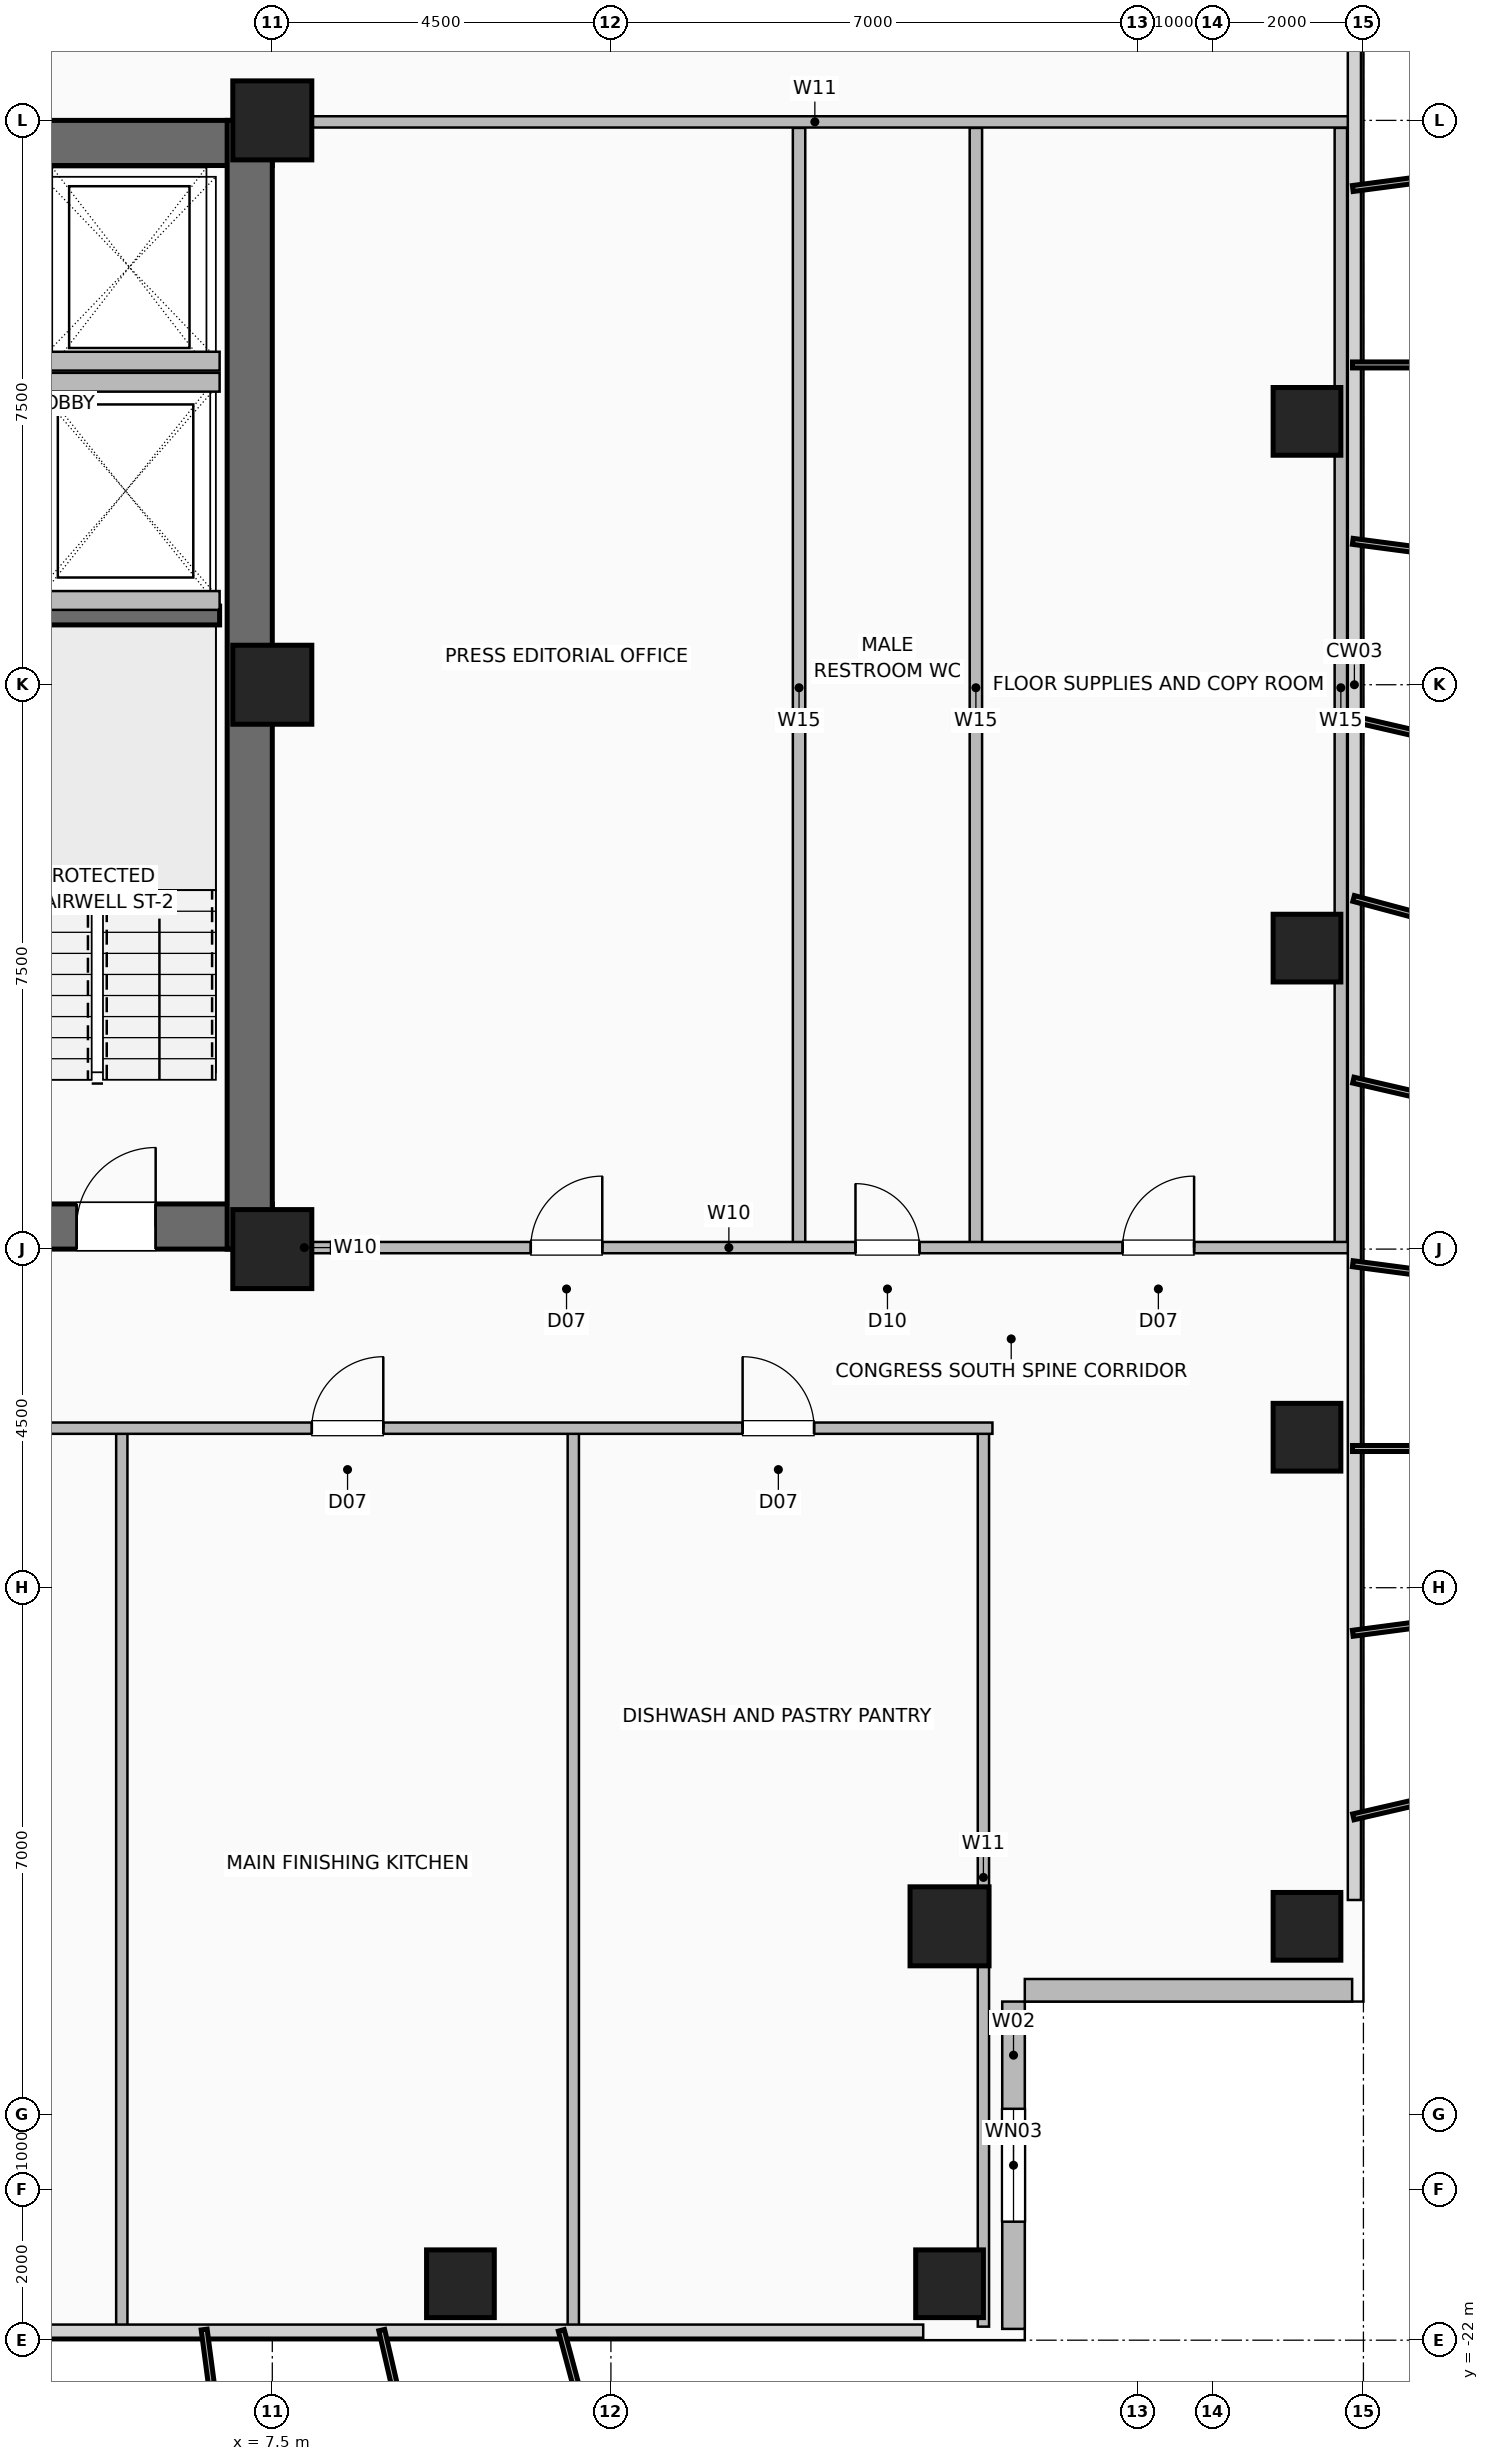
"""IFC4 building model, lengths in metres.
Left out: names, types, materials, properties, quantities, classifications, styles, units other than length and angle.
Written with IfcOpenShell. Run it as: python <this file> out.ifc"""

import sys

from ifc_helpers import new_model, si_unit, direction, frame, frame_2d, origin, origin_2d, place, context, subcontext, project, spatial, rectangle, hollow_rectangle, extrude, element, fill, save


model = new_model("IFC4")
c1 = context("Model", 3, precision=1e-05, world=origin(), true_north=direction((0.0, 1.0)))
c2 = subcontext(c1, "Body", "Model", "MODEL_VIEW")
j1 = project(units=[si_unit("LENGTHUNIT", "METRE"), si_unit("PLANEANGLEUNIT", "RADIAN")], contexts=[c1])
p1 = place(None, origin())
s1 = spatial("IfcSite", under=j1, at=p1, CompositionType="ELEMENT")
p2 = place(p1, origin())
s2 = spatial("IfcBuilding", under=s1, at=p2, CompositionType="ELEMENT")
p3 = place(p2, frame((0.0, 0.0, 126.4)))
s3 = spatial("IfcBuildingStorey", under=s2, at=p3, CompositionType="ELEMENT", Elevation=126.4)
for number, where, z_axis, x_axis in (
    (1, (7.5, -7.5, 0.0), (0.0, 0.0, 1.0), (1.0, 0.0, 0.0)),
    (2, (7.5, 0.0, 0.0), (0.0, 0.0, 1.0), (1.0, 0.0, 0.0)),
    (3, (7.5, 7.5, 0.0), (0.0, 0.0, 1.0), (1.0, 0.0, 0.0)),
):
    element("IfcColumn", number, at=place(p3, frame(where, z_axis=z_axis, x_axis=x_axis)), inside=s3, PredefinedType="COLUMN", context=c2, shape_type="SweptSolid", body=[
        extrude(hollow_rectangle(XDim=1.05, YDim=1.05, WallThickness=0.05, at=origin_2d()), origin(), (0.0, 0.0, 1.0), 3.6),
    ])
for number, where, z_axis, x_axis in (
    (4, (21.25, -16.5, 0.0), (0.0, 0.0, 1.0), (1.0, 0.0, 0.0)),
    (5, (21.25, -10.0, 0.0), (0.0, 0.0, 1.0), (1.0, 0.0, 0.0)),
    (6, (21.25, -3.5, 0.0), (0.0, 0.0, 1.0), (1.0, 0.0, 0.0)),
    (7, (21.25, 3.5, 0.0), (0.0, 0.0, 1.0), (1.0, 0.0, 0.0)),
    (8, (10.0, -21.25, 0.0), (0.0, 0.0, 1.0), (1.0, 0.0, 0.0)),
    (9, (16.5, -21.25, 0.0), (0.0, 0.0, 1.0), (1.0, 0.0, 0.0)),
):
    element("IfcColumn", number, at=place(p3, frame(where, z_axis=z_axis, x_axis=x_axis)), inside=s3, PredefinedType="COLUMN", context=c2, shape_type="SweptSolid", body=[
        extrude(hollow_rectangle(XDim=0.9, YDim=0.9, WallThickness=0.045, at=origin_2d()), origin(), (0.0, 0.0, 1.0), 3.6),
    ])
p4 = place(p3, frame((16.5, -16.5, 0.0), z_axis=(0.0, 0.0, 1.0), x_axis=(1.0, 0.0, 0.0)))
e10 = element("IfcColumn", 10, at=p4, inside=s3, PredefinedType="COLUMN", context=c2, shape_type="SweptSolid", body=[
    extrude(hollow_rectangle(XDim=1.05, YDim=1.05, WallThickness=0.05, at=origin_2d()), origin(), (0.0, 0.0, 1.0), 3.6),
])
p5 = place(p3, frame((17.35, -21.85, 0.0), z_axis=(0.0, 0.0, 1.0), x_axis=(0.0, 1.0, 0.0)))
e11 = element("IfcWall", 11, at=p5, inside=s3, PredefinedType="SOLIDWALL", context=c2, shape_type="SweptSolid", body=[
    extrude(rectangle(XDim=4.35, YDim=0.3, at=frame_2d((2.175, 0.0))), origin(), (0.0, 0.0, 1.0), 3.36),
])
p6 = place(p5, frame((1.425, 0.0, 0.9)))
e12 = element("IfcOpeningElement", 12, at=p6, cuts=e11, PredefinedType="OPENING", context=c2, shape_type="SweptSolid", body=[
    extrude(rectangle(XDim=1.5, YDim=1.8, at=frame_2d((0.75, 0.9))), frame((0.0, 0.16, 0.0), z_axis=(0.0, -1.0, 0.0), x_axis=(1.0, 0.0, 0.0)), (0.0, 0.0, 1.0), 0.32),
])
p7 = place(p3, frame((21.85, -17.35, 0.0), z_axis=(0.0, 0.0, 1.0), x_axis=(-1.0, 0.0, 0.0)))
e13 = element("IfcWall", 13, at=p7, inside=s3, PredefinedType="SOLIDWALL", context=c2, shape_type="SweptSolid", body=[
    extrude(rectangle(XDim=4.35, YDim=0.3, at=frame_2d((2.175, 0.0))), origin(), (0.0, 0.0, 1.0), 3.36),
])
p8 = place(p3, frame((-7.5, -7.2, 0.0), z_axis=(0.0, 0.0, 1.0), x_axis=(1.0, 0.0, 0.0)))
e14 = element("IfcWall", 14, at=p8, inside=s3, PredefinedType="SHEAR", context=c2, shape_type="SweptSolid", body=[
    extrude(rectangle(XDim=15.0, YDim=0.6, at=frame_2d((7.5, 0.0))), origin(), (0.0, 0.0, 1.0), 3.36),
])
p9 = place(p8, frame((1.55, 0.0, 0.0)))
e15 = element("IfcOpeningElement", 15, at=p9, cuts=e14, PredefinedType="OPENING", context=c2, shape_type="SweptSolid", body=[
    extrude(rectangle(XDim=1.05, YDim=2.08, at=frame_2d((0.525, 1.04))), frame((0.0, 0.31, 0.0), z_axis=(0.0, -1.0, 0.0), x_axis=(1.0, 0.0, 0.0)), (0.0, 0.0, 1.0), 0.62),
])
p10 = place(p8, frame((12.4, 0.0, 0.0)))
e16 = element("IfcOpeningElement", 16, at=p10, cuts=e14, PredefinedType="OPENING", context=c2, shape_type="SweptSolid", body=[
    extrude(rectangle(XDim=1.05, YDim=2.08, at=frame_2d((0.525, 1.04))), frame((0.0, 0.31, 0.0), z_axis=(0.0, -1.0, 0.0), x_axis=(1.0, 0.0, 0.0)), (0.0, 0.0, 1.0), 0.62),
])
p11 = place(p8, frame((5.2, 0.0, 0.0)))
e17 = element("IfcOpeningElement", 17, at=p11, cuts=e14, PredefinedType="OPENING", context=c2, shape_type="SweptSolid", body=[
    extrude(rectangle(XDim=1.0, YDim=2.08, at=frame_2d((0.5, 1.04))), frame((0.0, 0.31, 0.0), z_axis=(0.0, -1.0, 0.0), x_axis=(1.0, 0.0, 0.0)), (0.0, 0.0, 1.0), 0.62),
])
p12 = place(p8, frame((8.65, 0.0, 0.0)))
e18 = element("IfcOpeningElement", 18, at=p12, cuts=e14, PredefinedType="OPENING", context=c2, shape_type="SweptSolid", body=[
    extrude(rectangle(XDim=1.0, YDim=2.08, at=frame_2d((0.5, 1.04))), frame((0.0, 0.31, 0.0), z_axis=(0.0, -1.0, 0.0), x_axis=(1.0, 0.0, 0.0)), (0.0, 0.0, 1.0), 0.62),
])
for number, where, z_axis, x_axis in (
    (19, (-7.5, 7.2, 0.0), (0.0, 0.0, 1.0), (1.0, 0.0, 0.0)),
    (20, (7.2, -7.5, 0.0), (0.0, 0.0, 1.0), (0.0, 1.0, 0.0)),
):
    element("IfcWall", number, at=place(p3, frame(where, z_axis=z_axis, x_axis=x_axis)), inside=s3, PredefinedType="SHEAR", context=c2, shape_type="SweptSolid", body=[
        extrude(rectangle(XDim=15.0, YDim=0.6, at=frame_2d((7.5, 0.0))), origin(), (0.0, 0.0, 1.0), 3.36),
    ])
p13 = place(p3, frame((3.47, 0.92, 0.0), z_axis=(0.0, 0.0, 1.0), x_axis=(1.0, 0.0, 0.0)))
e21 = element("IfcWall", 21, at=p13, inside=s3, PredefinedType="SHEAR", context=c2, shape_type="SweptSolid", body=[
    extrude(rectangle(XDim=3.33, YDim=0.25, at=frame_2d((1.665, 0.0))), origin(), (0.0, 0.0, 1.0), 3.36),
])
p14 = place(p3, frame((4.38, 4.3, 0.0), z_axis=(0.0, 0.0, 1.0), x_axis=(1.0, 0.0, 0.0)))
e22 = element("IfcWall", 22, at=p14, inside=s3, PredefinedType="SHEAR", context=c2, shape_type="SweptSolid", body=[
    extrude(rectangle(XDim=2.42, YDim=0.25, at=frame_2d((1.21, 0.0))), origin(), (0.0, 0.0, 1.0), 3.36),
])
for number, where, z_axis, x_axis in (
    (23, (4.28, 1.12, 0.0), (0.0, 0.0, 1.0), (1.0, 0.0, 0.0)),
    (24, (4.28, 4.02, 0.0), (0.0, 0.0, 1.0), (1.0, 0.0, 0.0)),
):
    element("IfcWall", number, at=place(p3, frame(where, z_axis=z_axis, x_axis=x_axis)), inside=s3, PredefinedType="SHEAR", context=c2, shape_type="SweptSolid", body=[
        extrude(rectangle(XDim=2.52, YDim=0.25, at=frame_2d((1.26, 0.0))), origin(), (0.0, 0.0, 1.0), 3.36),
    ])
for number, where, z_axis, x_axis in (
    (25, (5.5, -21.82, 0.0), (0.0, 0.0, 1.0), (0.0, 1.0, 0.0)),
    (26, (11.5, -21.82, 0.0), (0.0, 0.0, 1.0), (0.0, 1.0, 0.0)),
    (27, (16.95, -21.82, 0.0), (0.0, 0.0, 1.0), (0.0, 1.0, 0.0)),
):
    element("IfcWall", number, at=place(p3, frame(where, z_axis=z_axis, x_axis=x_axis)), inside=s3, PredefinedType="PARTITIONING", context=c2, shape_type="SweptSolid", body=[
        extrude(rectangle(XDim=11.94, YDim=0.15, at=frame_2d((5.97, 0.0))), origin(), (0.0, 0.0, 1.0), 3.36),
    ])
p15 = place(p3, frame((-17.07, -9.88, 0.0), z_axis=(0.0, 0.0, 1.0), x_axis=(1.0, 0.0, 0.0)))
e28 = element("IfcWall", 28, at=p15, inside=s3, PredefinedType="PARTITIONING", context=c2, shape_type="SweptSolid", body=[
    extrude(rectangle(XDim=34.14, YDim=0.15, at=frame_2d((17.07, 0.0))), origin(), (0.0, 0.0, 1.0), 3.36),
])
p16 = place(p15, frame((4.445, 0.0, 0.0)))
e29 = element("IfcOpeningElement", 29, at=p16, cuts=e28, PredefinedType="OPENING", context=c2, shape_type="SweptSolid", body=[
    extrude(rectangle(XDim=1.8, YDim=2.08, at=frame_2d((0.9, 1.04))), frame((0.0, 0.085, 0.0), z_axis=(0.0, -1.0, 0.0), x_axis=(1.0, 0.0, 0.0)), (0.0, 0.0, 1.0), 0.17),
])
p17 = place(p15, frame((16.095, 0.0, 0.0)))
e30 = element("IfcOpeningElement", 30, at=p17, cuts=e28, PredefinedType="OPENING", context=c2, shape_type="SweptSolid", body=[
    extrude(rectangle(XDim=0.95, YDim=2.06, at=frame_2d((0.475, 1.03))), frame((0.0, 0.085, 0.0), z_axis=(0.0, -1.0, 0.0), x_axis=(1.0, 0.0, 0.0)), (0.0, 0.0, 1.0), 0.17),
])
p18 = place(p15, frame((25.095, 0.0, 0.0)))
e31 = element("IfcOpeningElement", 31, at=p18, cuts=e28, PredefinedType="OPENING", context=c2, shape_type="SweptSolid", body=[
    extrude(rectangle(XDim=0.95, YDim=2.06, at=frame_2d((0.475, 1.03))), frame((0.0, 0.085, 0.0), z_axis=(0.0, -1.0, 0.0), x_axis=(1.0, 0.0, 0.0)), (0.0, 0.0, 1.0), 0.17),
])
p19 = place(p15, frame((30.82, 0.0, 0.0)))
e32 = element("IfcOpeningElement", 32, at=p19, cuts=e28, PredefinedType="OPENING", context=c2, shape_type="SweptSolid", body=[
    extrude(rectangle(XDim=0.95, YDim=2.06, at=frame_2d((0.475, 1.03))), frame((0.0, 0.085, 0.0), z_axis=(0.0, -1.0, 0.0), x_axis=(1.0, 0.0, 0.0)), (0.0, 0.0, 1.0), 0.17),
])
p20 = place(p3, frame((7.45, -7.48, 0.0), z_axis=(0.0, 0.0, 1.0), x_axis=(1.0, 0.0, 0.0)))
e33 = element("IfcWall", 33, at=p20, inside=s3, PredefinedType="PARTITIONING", context=c2, shape_type="SweptSolid", body=[
    extrude(rectangle(XDim=0.95, YDim=0.15, at=frame_2d((0.475, 0.0))), origin(), (0.0, 0.0, 1.0), 3.36),
])
for number, where, z_axis, x_axis in (
    (34, (16.85, -7.48, 0.0), (0.0, 0.0, 1.0), (0.0, 1.0, 0.0)),
    (35, (14.5, -7.48, 0.0), (0.0, 0.0, 1.0), (0.0, 1.0, 0.0)),
    (36, (21.7, -7.48, 0.0), (0.0, 0.0, 1.0), (0.0, 1.0, 0.0)),
):
    element("IfcWall", number, at=place(p3, frame(where, z_axis=z_axis, x_axis=x_axis)), inside=s3, PredefinedType="PLUMBINGWALL", context=c2, shape_type="SweptSolid", body=[
        extrude(rectangle(XDim=14.88, YDim=0.165, at=frame_2d((7.44, 0.0))), origin(), (0.0, 0.0, 1.0), 3.36),
    ])
p21 = place(p3, frame((8.28, -7.48, 0.0), z_axis=(0.0, 0.0, 1.0), x_axis=(1.0, 0.0, 0.0)))
e37 = element("IfcWall", 37, at=p21, inside=s3, PredefinedType="PARTITIONING", context=c2, shape_type="SweptSolid", body=[
    extrude(rectangle(XDim=13.54, YDim=0.15, at=frame_2d((6.77, 0.0))), origin(), (0.0, 0.0, 1.0), 3.36),
])
p22 = place(p21, frame((2.655, 0.0, 0.0)))
e38 = element("IfcOpeningElement", 38, at=p22, cuts=e37, PredefinedType="OPENING", context=c2, shape_type="SweptSolid", body=[
    extrude(rectangle(XDim=0.95, YDim=2.06, at=frame_2d((0.475, 1.03))), frame((0.0, 0.085, 0.0), z_axis=(0.0, -1.0, 0.0), x_axis=(1.0, 0.0, 0.0)), (0.0, 0.0, 1.0), 0.17),
])
p23 = place(p21, frame((6.97, 0.0, 0.0)))
e39 = element("IfcOpeningElement", 39, at=p23, cuts=e37, PredefinedType="OPENING", context=c2, shape_type="SweptSolid", body=[
    extrude(rectangle(XDim=0.85, YDim=2.05, at=frame_2d((0.425, 1.025))), frame((0.0, 0.085, 0.0), z_axis=(0.0, -1.0, 0.0), x_axis=(1.0, 0.0, 0.0)), (0.0, 0.0, 1.0), 0.17),
])
p24 = place(p21, frame((10.52, 0.0, 0.0)))
e40 = element("IfcOpeningElement", 40, at=p24, cuts=e37, PredefinedType="OPENING", context=c2, shape_type="SweptSolid", body=[
    extrude(rectangle(XDim=0.95, YDim=2.06, at=frame_2d((0.475, 1.03))), frame((0.0, 0.085, 0.0), z_axis=(0.0, -1.0, 0.0), x_axis=(1.0, 0.0, 0.0)), (0.0, 0.0, 1.0), 0.17),
])
p25 = place(p3, frame((7.6, 7.48, 0.0), z_axis=(0.0, 0.0, 1.0), x_axis=(1.0, 0.0, 0.0)))
e41 = element("IfcWall", 41, at=p25, inside=s3, PredefinedType="PARTITIONING", context=c2, shape_type="SweptSolid", body=[
    extrude(rectangle(XDim=14.22, YDim=0.15, at=frame_2d((7.11, 0.0))), origin(), (0.0, 0.0, 1.0), 3.36),
])
p26 = place(p6, origin())
e42 = element("IfcWindow", 42, at=p26, inside=s3, PartitioningType="SINGLE_PANEL", PredefinedType="WINDOW", context=c2, shape_type="SweptSolid", body=[
    extrude(rectangle(XDim=1.5, YDim=1.8, at=frame_2d((0.75, 0.9))), frame((0.0, 0.03, 0.0), z_axis=(0.0, -1.0, 0.0), x_axis=(1.0, 0.0, 0.0)), (0.0, 0.0, 1.0), 0.06),
])
fill(e12, e42)
p27 = place(p10, origin())
e43 = element("IfcDoor", 43, at=p27, inside=s3, OperationType="SINGLE_SWING_RIGHT", PredefinedType="DOOR", context=c2, shape_type="SweptSolid", body=[
    extrude(rectangle(XDim=1.05, YDim=2.08, at=frame_2d((0.525, 1.04))), frame((0.0, 0.025, 0.0), z_axis=(0.0, -1.0, 0.0), x_axis=(1.0, 0.0, 0.0)), (0.0, 0.0, 1.0), 0.05),
])
fill(e16, e43)
p28 = place(p18, origin())
e44 = element("IfcDoor", 44, at=p28, inside=s3, OperationType="SINGLE_SWING_RIGHT", PredefinedType="DOOR", context=c2, shape_type="SweptSolid", body=[
    extrude(rectangle(XDim=0.95, YDim=2.06, at=frame_2d((0.475, 1.03))), frame((0.0, 0.025, 0.0), z_axis=(0.0, -1.0, 0.0), x_axis=(1.0, 0.0, 0.0)), (0.0, 0.0, 1.0), 0.05),
])
fill(e31, e44)
p29 = place(p19, origin())
e45 = element("IfcDoor", 45, at=p29, inside=s3, OperationType="SINGLE_SWING_LEFT", PredefinedType="DOOR", context=c2, shape_type="SweptSolid", body=[
    extrude(rectangle(XDim=0.95, YDim=2.06, at=frame_2d((0.475, 1.03))), frame((0.0, 0.025, 0.0), z_axis=(0.0, -1.0, 0.0), x_axis=(1.0, 0.0, 0.0)), (0.0, 0.0, 1.0), 0.05),
])
fill(e32, e45)
p30 = place(p22, origin())
e46 = element("IfcDoor", 46, at=p30, inside=s3, OperationType="SINGLE_SWING_RIGHT", PredefinedType="DOOR", context=c2, shape_type="SweptSolid", body=[
    extrude(rectangle(XDim=0.95, YDim=2.06, at=frame_2d((0.475, 1.03))), frame((0.0, 0.025, 0.0), z_axis=(0.0, -1.0, 0.0), x_axis=(1.0, 0.0, 0.0)), (0.0, 0.0, 1.0), 0.05),
])
fill(e38, e46)
p31 = place(p23, origin())
e47 = element("IfcDoor", 47, at=p31, inside=s3, OperationType="SINGLE_SWING_LEFT", PredefinedType="DOOR", context=c2, shape_type="SweptSolid", body=[
    extrude(rectangle(XDim=0.85, YDim=2.05, at=frame_2d((0.425, 1.025))), frame((0.0, 0.025, 0.0), z_axis=(0.0, -1.0, 0.0), x_axis=(1.0, 0.0, 0.0)), (0.0, 0.0, 1.0), 0.05),
])
fill(e39, e47)
p32 = place(p24, origin())
e48 = element("IfcDoor", 48, at=p32, inside=s3, OperationType="SINGLE_SWING_RIGHT", PredefinedType="DOOR", context=c2, shape_type="SweptSolid", body=[
    extrude(rectangle(XDim=0.95, YDim=2.06, at=frame_2d((0.475, 1.03))), frame((0.0, 0.025, 0.0), z_axis=(0.0, -1.0, 0.0), x_axis=(1.0, 0.0, 0.0)), (0.0, 0.0, 1.0), 0.05),
])
fill(e40, e48)
save(model, sys.argv[1])
